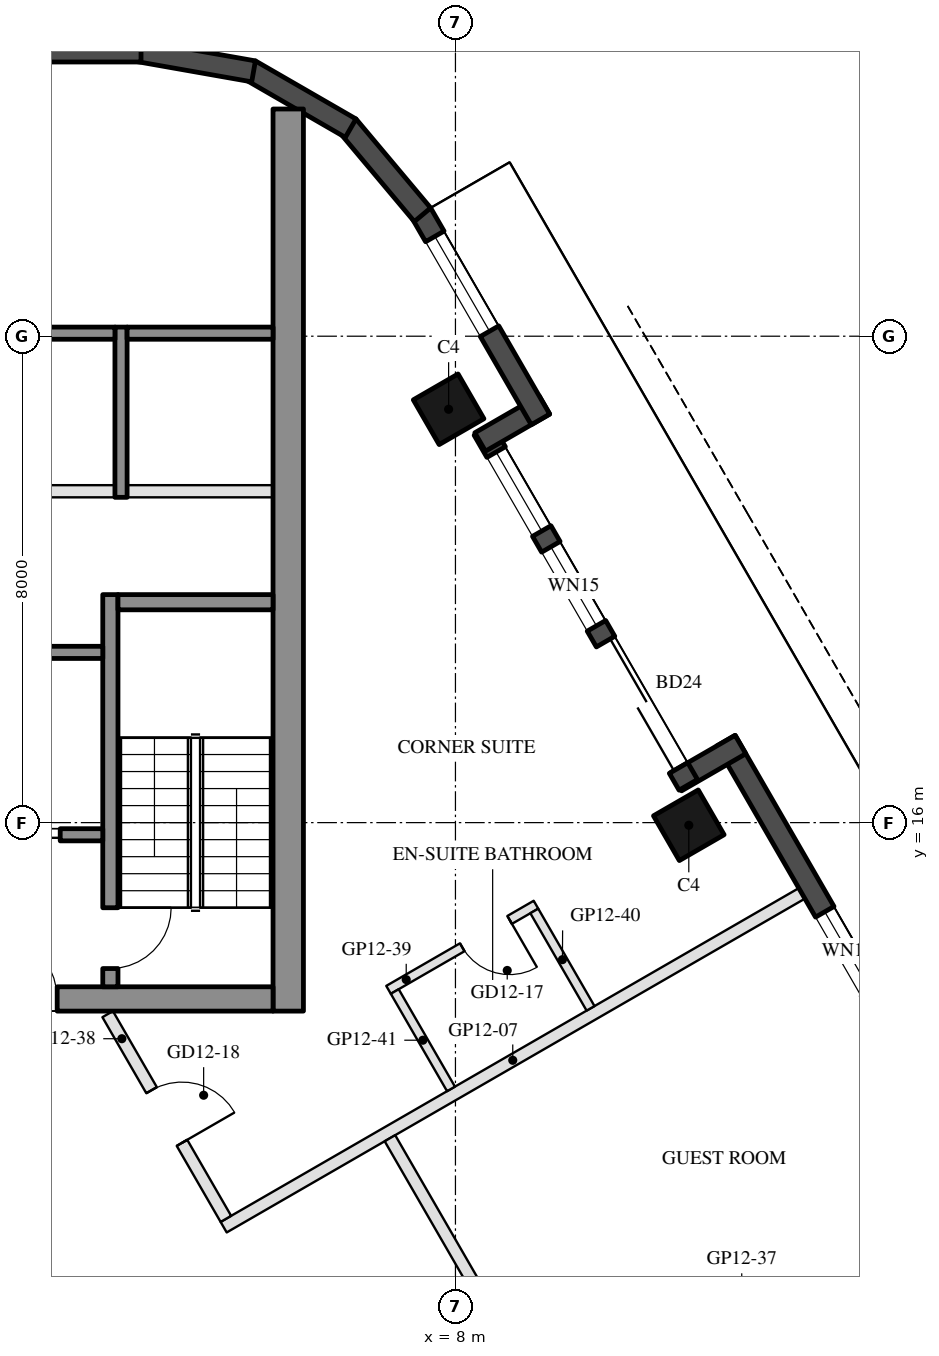
"""IFC4 building model, lengths in metres.
Left out: names, types, materials, properties, quantities, classifications, styles, units other than length and angle.
Written with IfcOpenShell. Run it as: python <this file> out.ifc"""

import sys

from ifc_helpers import new_model, si_unit, direction, frame, frame_2d, origin, origin_2d, place, context, subcontext, project, spatial, rectangle, hollow_rectangle, extrude, element, fill, save


model = new_model("IFC4")
c1 = context("Model", 3, precision=1e-05, world=origin(), true_north=direction((0.0, 1.0)))
c2 = subcontext(c1, "Body", "Model", "MODEL_VIEW")
j1 = project(units=[si_unit("LENGTHUNIT", "METRE"), si_unit("PLANEANGLEUNIT", "RADIAN")], contexts=[c1])
p1 = place(None, origin())
s1 = spatial("IfcSite", under=j1, at=p1, CompositionType="ELEMENT")
p2 = place(p1, origin())
s2 = spatial("IfcBuilding", under=s1, at=p2, CompositionType="ELEMENT")
p3 = place(p2, frame((0.0, 0.0, 150.3)))
s3 = spatial("IfcBuildingStorey", under=s2, at=p3, CompositionType="ELEMENT", Elevation=150.3)
for number, where, z_axis, x_axis in (
    (1, (11.838, 15.957, 0.0), (0.0, 0.0, 1.0), (-0.5, 0.866, 0.0)),
    (2, (7.888, 22.798, 0.0), (0.0, 0.0, 1.0), (-0.5, 0.866, 0.0)),
):
    element("IfcColumn", number, at=place(p3, frame(where, z_axis=z_axis, x_axis=x_axis)), inside=s3, PredefinedType="COLUMN", context=c2, shape_type="SweptSolid", body=[
        extrude(hollow_rectangle(XDim=0.85, YDim=0.85, WallThickness=0.04, at=origin_2d()), origin(), (0.0, 0.0, 1.0), 3.7),
    ])
p4 = place(p3, frame((17.299, 8.948, 0.0), z_axis=(0.0, 0.0, 1.0), x_axis=(-0.500010041276, 0.866019606374, 0.0)))
e3 = element("IfcWall", 3, at=p4, inside=s3, PredefinedType="SOLIDWALL", context=c2, shape_type="SweptSolid", body=[
    extrude(rectangle(XDim=9.7, YDim=0.35, at=frame_2d((4.85, 0.0))), origin(), (0.0, 0.0, 1.0), 3.55),
])
p5 = place(p4, frame((1.762, 0.0, 0.0)))
e4 = element("IfcOpeningElement", 4, at=p5, cuts=e3, PredefinedType="OPENING", context=c2, shape_type="SweptSolid", body=[
    extrude(rectangle(XDim=2.4, YDim=2.4, at=frame_2d((1.2, 1.2))), frame((0.0, 0.185, 0.0), z_axis=(0.0, -1.0, 0.0), x_axis=(1.0, 0.0, 0.0)), (0.0, 0.0, 1.0), 0.37),
])
p6 = place(p4, frame((4.949, 0.0, 0.3)))
e5 = element("IfcOpeningElement", 5, at=p6, cuts=e3, PredefinedType="OPENING", context=c2, shape_type="SweptSolid", body=[
    extrude(rectangle(XDim=1.5, YDim=2.65, at=frame_2d((0.75, 1.325))), frame((0.0, 0.185, 0.0), z_axis=(0.0, -1.0, 0.0), x_axis=(1.0, 0.0, 0.0)), (0.0, 0.0, 1.0), 0.37),
])
p7 = place(p3, frame((12.688, 17.284, 0.0), z_axis=(0.0, 0.0, 1.0), x_axis=(-0.865955602162, -0.500120880472, 0.0)))
e6 = element("IfcWall", 6, at=p7, inside=s3, PredefinedType="SOLIDWALL", context=c2, shape_type="SweptSolid", body=[
    extrude(rectangle(XDim=1.22, YDim=0.35, at=frame_2d((0.61, 0.0))), origin(), (0.0, 0.0, 1.0), 3.55),
])
p8 = place(p3, frame((11.829, 16.621, 0.0), z_axis=(0.0, 0.0, 1.0), x_axis=(-0.500003597184, 0.866023326939, 0.0)))
e7 = element("IfcWall", 7, at=p8, inside=s3, PredefinedType="SOLIDWALL", context=c2, shape_type="SweptSolid", body=[
    extrude(rectangle(XDim=6.74, YDim=0.35, at=frame_2d((3.37, 0.0))), origin(), (0.0, 0.0, 1.0), 3.55),
])
p9 = place(p8, frame((0.32, 0.0, 0.0)))
e8 = element("IfcOpeningElement", 8, at=p9, cuts=e7, PredefinedType="OPENING", context=c2, shape_type="SweptSolid", body=[
    extrude(rectangle(XDim=2.4, YDim=2.4, at=frame_2d((1.2, 1.2))), frame((0.0, 0.185, 0.0), z_axis=(0.0, -1.0, 0.0), x_axis=(1.0, 0.0, 0.0)), (0.0, 0.0, 1.0), 0.37),
])
p10 = place(p8, frame((3.02, 0.0, 0.3)))
e9 = element("IfcOpeningElement", 9, at=p10, cuts=e7, PredefinedType="OPENING", context=c2, shape_type="SweptSolid", body=[
    extrude(rectangle(XDim=1.5, YDim=2.65, at=frame_2d((0.75, 1.325))), frame((0.0, 0.185, 0.0), z_axis=(0.0, -1.0, 0.0), x_axis=(1.0, 0.0, 0.0)), (0.0, 0.0, 1.0), 0.37),
])
p11 = place(p8, frame((4.82, 0.0, 0.3)))
e10 = element("IfcOpeningElement", 10, at=p11, cuts=e7, PredefinedType="OPENING", context=c2, shape_type="SweptSolid", body=[
    extrude(rectangle(XDim=1.5, YDim=2.65, at=frame_2d((0.75, 1.325))), frame((0.0, 0.185, 0.0), z_axis=(0.0, -1.0, 0.0), x_axis=(1.0, 0.0, 0.0)), (0.0, 0.0, 1.0), 0.37),
])
p12 = place(p3, frame((8.406, 22.26, 0.0), z_axis=(0.0, 0.0, 1.0), x_axis=(0.865955602162, 0.500120880472, 0.0)))
e11 = element("IfcWall", 11, at=p12, inside=s3, PredefinedType="SOLIDWALL", context=c2, shape_type="SweptSolid", body=[
    extrude(rectangle(XDim=1.22, YDim=0.35, at=frame_2d((0.61, 0.0))), origin(), (0.0, 0.0, 1.0), 3.55),
])
p13 = place(p3, frame((9.398, 22.631, 0.0), z_axis=(0.0, 0.0, 1.0), x_axis=(-0.499954521343, 0.866051659307, 0.0)))
e12 = element("IfcWall", 12, at=p13, inside=s3, PredefinedType="SOLIDWALL", context=c2, shape_type="SweptSolid", body=[
    extrude(rectangle(XDim=3.916, YDim=0.35, at=frame_2d((1.958, 0.0))), origin(), (0.0, 0.0, 1.0), 3.55),
])
p14 = place(p13, frame((1.675, 0.0, 0.3)))
e13 = element("IfcOpeningElement", 13, at=p14, cuts=e12, PredefinedType="OPENING", context=c2, shape_type="SweptSolid", body=[
    extrude(rectangle(XDim=1.8, YDim=2.65, at=frame_2d((0.9, 1.325))), frame((0.0, 0.185, 0.0), z_axis=(0.0, -1.0, 0.0), x_axis=(1.0, 0.0, 0.0)), (0.0, 0.0, 1.0), 0.37),
])
p15 = place(p3, frame((7.458, 25.998, 0.0), z_axis=(0.0, 0.0, 1.0), x_axis=(-0.642808304945, 0.766027077259, 0.0)))
e14 = element("IfcWall", 14, at=p15, inside=s3, PredefinedType="SOLIDWALL", context=c2, shape_type="SweptSolid", body=[
    extrude(rectangle(XDim=1.91, YDim=0.35, at=frame_2d((0.955, 0.0))), origin(), (0.0, 0.0, 1.0), 3.55),
])
for number, where, z_axis, x_axis in (
    (15, (6.277, 27.422, 0.0), (0.0, 0.0, 1.0), (-0.866, 0.5, 0.0)),
    (16, (4.68, 28.356, 0.0), (0.0, 0.0, 1.0), (-0.985, 0.174, 0.0)),
):
    element("IfcWall", number, at=place(p3, frame(where, z_axis=z_axis, x_axis=x_axis)), inside=s3, PredefinedType="SOLIDWALL", context=c2, shape_type="SweptSolid", body=[
        extrude(rectangle(XDim=1.91, YDim=0.35, at=frame_2d((0.955, 0.0))), origin(), (0.0, 0.0, 1.0), 3.55),
    ])
p16 = place(p3, frame((2.829, 28.685, 0.0), z_axis=(0.0, 0.0, 1.0), x_axis=(-1.0, 0.0, 0.0)))
e17 = element("IfcWall", 17, at=p16, inside=s3, PredefinedType="SOLIDWALL", context=c2, shape_type="SweptSolid", body=[
    extrude(rectangle(XDim=5.658, YDim=0.35, at=frame_2d((2.829, 0.0))), origin(), (0.0, 0.0, 1.0), 3.55),
])
p17 = place(p3, frame((5.25, 12.9, 0.0), z_axis=(0.0, 0.0, 1.0), x_axis=(0.0, 1.0, 0.0)))
e18 = element("IfcWall", 18, at=p17, inside=s3, PredefinedType="SHEAR", context=c2, shape_type="SweptSolid", body=[
    extrude(rectangle(XDim=14.837, YDim=0.5, at=frame_2d((7.418, 0.0))), origin(), (0.0, 0.0, 1.0), 3.5),
])
p18 = place(p3, frame((5.0, 13.1, 0.0), z_axis=(0.0, 0.0, 1.0), x_axis=(-1.0, 0.0, 0.0)))
e19 = element("IfcWall", 19, at=p18, inside=s3, PredefinedType="SHEAR", context=c2, shape_type="SweptSolid", body=[
    extrude(rectangle(XDim=10.0, YDim=0.4, at=frame_2d((5.0, 0.0))), origin(), (0.0, 0.0, 1.0), 3.5),
])
p19 = place(p18, frame((3.55, 0.0, 0.0)))
e20 = element("IfcOpeningElement", 20, at=p19, cuts=e19, PredefinedType="OPENING", context=c2, shape_type="SweptSolid", body=[
    extrude(rectangle(XDim=1.1, YDim=2.1, at=frame_2d((0.55, 1.05))), frame((0.0, 0.21, 0.0), z_axis=(0.0, -1.0, 0.0), x_axis=(1.0, 0.0, 0.0)), (0.0, 0.0, 1.0), 0.42),
])
p20 = place(p18, frame((5.85, 0.0, 0.0)))
e21 = element("IfcOpeningElement", 21, at=p20, cuts=e19, PredefinedType="OPENING", context=c2, shape_type="SweptSolid", body=[
    extrude(rectangle(XDim=1.4, YDim=2.1, at=frame_2d((0.7, 1.05))), frame((0.0, 0.21, 0.0), z_axis=(0.0, -1.0, 0.0), x_axis=(1.0, 0.0, 0.0)), (0.0, 0.0, 1.0), 0.42),
])
p21 = place(p3, frame((2.325, 13.3, 0.0), z_axis=(0.0, 0.0, 1.0), x_axis=(0.0, 1.0, 0.0)))
e22 = element("IfcWall", 22, at=p21, inside=s3, PredefinedType="SHEAR", context=c2, shape_type="SweptSolid", body=[
    extrude(rectangle(XDim=6.45, YDim=0.25, at=frame_2d((3.225, 0.0))), origin(), (0.0, 0.0, 1.0), 3.5),
])
p22 = place(p21, frame((0.3, 0.0, 0.0)))
e23 = element("IfcOpeningElement", 23, at=p22, cuts=e22, PredefinedType="OPENING", context=c2, shape_type="SweptSolid", body=[
    extrude(rectangle(XDim=1.0, YDim=2.1, at=frame_2d((0.5, 1.05))), frame((0.0, 0.135, 0.0), z_axis=(0.0, -1.0, 0.0), x_axis=(1.0, 0.0, 0.0)), (0.0, 0.0, 1.0), 0.27),
])
p23 = place(p3, frame((5.0, 19.625, 0.0), z_axis=(0.0, 0.0, 1.0), x_axis=(-1.0, 0.0, 0.0)))
e24 = element("IfcWall", 24, at=p23, inside=s3, PredefinedType="SHEAR", context=c2, shape_type="SweptSolid", body=[
    extrude(rectangle(XDim=2.55, YDim=0.25, at=frame_2d((1.275, 0.0))), origin(), (0.0, 0.0, 1.0), 3.5),
])
p24 = place(p3, frame((2.2, 18.8, 0.0), z_axis=(0.0, 0.0, 1.0), x_axis=(-1.0, 0.0, 0.0)))
e25 = element("IfcWall", 25, at=p24, inside=s3, PredefinedType="SHEAR", context=c2, shape_type="SweptSolid", body=[
    extrude(rectangle(XDim=2.8, YDim=0.2, at=frame_2d((1.4, 0.0))), origin(), (0.0, 0.0, 1.0), 3.5),
])
p25 = place(p3, frame((2.2, 15.8, 0.0), z_axis=(0.0, 0.0, 1.0), x_axis=(-1.0, 0.0, 0.0)))
e26 = element("IfcWall", 26, at=p25, inside=s3, PredefinedType="SHEAR", context=c2, shape_type="SweptSolid", body=[
    extrude(rectangle(XDim=2.8, YDim=0.2, at=frame_2d((1.4, 0.0))), origin(), (0.0, 0.0, 1.0), 3.5),
])
p26 = place(p25, frame((0.7, 0.0, 0.0)))
e27 = element("IfcOpeningElement", 27, at=p26, cuts=e26, PredefinedType="OPENING", context=c2, shape_type="SweptSolid", body=[
    extrude(rectangle(XDim=1.2, YDim=2.1, at=frame_2d((0.6, 1.05))), frame((0.0, 0.11, 0.0), z_axis=(0.0, -1.0, 0.0), x_axis=(1.0, 0.0, 0.0)), (0.0, 0.0, 1.0), 0.22),
])
p27 = place(p3, frame((2.5, 21.35, 0.0), z_axis=(0.0, 0.0, 1.0), x_axis=(0.0, 1.0, 0.0)))
e28 = element("IfcWall", 28, at=p27, inside=s3, PredefinedType="SHEAR", context=c2, shape_type="SweptSolid", body=[
    extrude(rectangle(XDim=2.8, YDim=0.2, at=frame_2d((1.4, 0.0))), origin(), (0.0, 0.0, 1.0), 3.5),
])
p28 = place(p3, frame((5.0, 24.05, 0.0), z_axis=(0.0, 0.0, 1.0), x_axis=(-1.0, 0.0, 0.0)))
e29 = element("IfcWall", 29, at=p28, inside=s3, PredefinedType="SHEAR", context=c2, shape_type="SweptSolid", body=[
    extrude(rectangle(XDim=2.4, YDim=0.2, at=frame_2d((1.2, 0.0))), origin(), (0.0, 0.0, 1.0), 3.5),
])
p29 = place(p3, frame((2.4, 24.05, 0.0), z_axis=(0.0, 0.0, 1.0), x_axis=(-1.0, 0.0, 0.0)))
e30 = element("IfcWall", 30, at=p29, inside=s3, PredefinedType="SHEAR", context=c2, shape_type="SweptSolid", body=[
    extrude(rectangle(XDim=2.8, YDim=0.2, at=frame_2d((1.4, 0.0))), origin(), (0.0, 0.0, 1.0), 3.5),
])
p30 = place(p3, frame((5.0, 21.45, 0.0), z_axis=(0.0, 0.0, 1.0), x_axis=(-1.0, 0.0, 0.0)))
e31 = element("IfcWall", 31, at=p30, inside=s3, PredefinedType="PARTITIONING", context=c2, shape_type="SweptSolid", body=[
    extrude(rectangle(XDim=2.4, YDim=0.2, at=frame_2d((1.2, 0.0))), origin(), (0.0, 0.0, 1.0), 3.5),
])
p31 = place(p3, frame((2.4, 21.45, 0.0), z_axis=(0.0, 0.0, 1.0), x_axis=(-1.0, 0.0, 0.0)))
e32 = element("IfcWall", 32, at=p31, inside=s3, PredefinedType="PARTITIONING", context=c2, shape_type="SweptSolid", body=[
    extrude(rectangle(XDim=2.8, YDim=0.2, at=frame_2d((1.4, 0.0))), origin(), (0.0, 0.0, 1.0), 3.5),
])
p32 = place(p3, frame((13.697, 14.836, 0.0), z_axis=(0.0, 0.0, 1.0), x_axis=(-0.866027479907, -0.499996404033, 0.0)))
e33 = element("IfcWall", 33, at=p32, inside=s3, PredefinedType="PARTITIONING", context=c2, shape_type="SweptSolid", body=[
    extrude(rectangle(XDim=10.98, YDim=0.2, at=frame_2d((5.49, 0.0))), origin(), (0.0, 0.0, 1.0), 3.06),
])
p33 = place(p3, frame((6.923, 10.81, 0.0), z_axis=(0.0, 0.0, 1.0), x_axis=(0.500007257026, -0.866021213898, 0.0)))
e34 = element("IfcWall", 34, at=p33, inside=s3, PredefinedType="PARTITIONING", context=c2, shape_type="SweptSolid", body=[
    extrude(rectangle(XDim=7.569, YDim=0.2, at=frame_2d((3.784, 0.0))), origin(), (0.0, 0.0, 1.0), 2.95),
])
p34 = place(p33, frame((4.121, 0.0, 0.0)))
e35 = element("IfcOpeningElement", 35, at=p34, cuts=e34, PredefinedType="OPENING", context=c2, shape_type="SweptSolid", body=[
    extrude(rectangle(XDim=1.0, YDim=2.1, at=frame_2d((0.5, 1.05))), frame((0.0, 0.11, 0.0), z_axis=(0.0, -1.0, 0.0), x_axis=(1.0, 0.0, 0.0)), (0.0, 0.0, 1.0), 0.22),
])
p35 = place(p3, frame((2.281, 12.85, 0.0), z_axis=(0.0, 0.0, 1.0), x_axis=(0.500008716408, -0.866020371305, 0.0)))
e36 = element("IfcWall", 36, at=p35, inside=s3, PredefinedType="PARTITIONING", context=c2, shape_type="SweptSolid", body=[
    extrude(rectangle(XDim=3.888, YDim=0.2, at=frame_2d((1.944, 0.0))), origin(), (0.0, 0.0, 1.0), 2.95),
])
p36 = place(p35, frame((1.444, 0.0, 0.0)))
e37 = element("IfcOpeningElement", 37, at=p36, cuts=e36, PredefinedType="OPENING", context=c2, shape_type="SweptSolid", body=[
    extrude(rectangle(XDim=1.0, YDim=2.1, at=frame_2d((0.5, 1.05))), frame((0.0, 0.11, 0.0), z_axis=(0.0, -1.0, 0.0), x_axis=(1.0, 0.0, 0.0)), (0.0, 0.0, 1.0), 0.22),
])
p37 = place(p3, frame((9.324, 14.65, 0.0), z_axis=(0.0, 0.0, 1.0), x_axis=(-0.866034573852, -0.49998411664, 0.0)))
e38 = element("IfcWall", 38, at=p37, inside=s3, PredefinedType="PARTITIONING", context=c2, shape_type="SweptSolid", body=[
    extrude(rectangle(XDim=2.8, YDim=0.15, at=frame_2d((1.4, 0.0))), origin(), (0.0, 0.0, 1.0), 2.95),
])
p38 = place(p37, frame((0.5, 0.0, 0.0)))
e39 = element("IfcOpeningElement", 39, at=p38, cuts=e38, PredefinedType="OPENING", context=c2, shape_type="SweptSolid", body=[
    extrude(rectangle(XDim=0.9, YDim=2.1, at=frame_2d((0.45, 1.05))), frame((0.0, 0.085, 0.0), z_axis=(0.0, -1.0, 0.0), x_axis=(1.0, 0.0, 0.0)), (0.0, 0.0, 1.0), 0.17),
])
for number, where, z_axis, x_axis in (
    (40, (10.222, 12.945, 0.0), (0.0, 0.0, 1.0), (-0.5, 0.866, 0.0)),
    (41, (7.927, 11.62, 0.0), (0.0, 0.0, 1.0), (-0.5, 0.866, 0.0)),
):
    element("IfcWall", number, at=place(p3, frame(where, z_axis=z_axis, x_axis=x_axis)), inside=s3, PredefinedType="PARTITIONING", context=c2, shape_type="SweptSolid", body=[
        extrude(rectangle(XDim=1.85, YDim=0.15, at=frame_2d((0.925, 0.0))), origin(), (0.0, 0.0, 1.0), 2.95),
    ])
p39 = place(p6, origin())
e42 = element("IfcWindow", 42, at=p39, inside=s3, PartitioningType="SINGLE_PANEL", PredefinedType="WINDOW", context=c2, shape_type="SweptSolid", body=[
    extrude(rectangle(XDim=1.5, YDim=2.65, at=frame_2d((0.75, 1.325))), frame((0.0, 0.03, 0.0), z_axis=(0.0, -1.0, 0.0), x_axis=(1.0, 0.0, 0.0)), (0.0, 0.0, 1.0), 0.06),
])
fill(e5, e42)
p40 = place(p9, frame((2.4, 0.0, 0.0), z_axis=(0.0, 0.0, 1.0), x_axis=(-1.0, 0.0, 0.0)))
e43 = element("IfcDoor", 43, at=p40, inside=s3, OperationType="SLIDING_TO_LEFT", PredefinedType="DOOR", context=c2, shape_type="SweptSolid", body=[
    extrude(rectangle(XDim=2.4, YDim=2.4, at=frame_2d((1.2, 1.2))), frame((0.0, 0.025, 0.0), z_axis=(0.0, -1.0, 0.0), x_axis=(1.0, 0.0, 0.0)), (0.0, 0.0, 1.0), 0.05),
])
fill(e8, e43)
p41 = place(p10, origin())
e44 = element("IfcWindow", 44, at=p41, inside=s3, PartitioningType="SINGLE_PANEL", PredefinedType="WINDOW", context=c2, shape_type="SweptSolid", body=[
    extrude(rectangle(XDim=1.5, YDim=2.65, at=frame_2d((0.75, 1.325))), frame((0.0, 0.03, 0.0), z_axis=(0.0, -1.0, 0.0), x_axis=(1.0, 0.0, 0.0)), (0.0, 0.0, 1.0), 0.06),
])
fill(e9, e44)
p42 = place(p11, origin())
e45 = element("IfcWindow", 45, at=p42, inside=s3, PartitioningType="SINGLE_PANEL", PredefinedType="WINDOW", context=c2, shape_type="SweptSolid", body=[
    extrude(rectangle(XDim=1.5, YDim=2.65, at=frame_2d((0.75, 1.325))), frame((0.0, 0.03, 0.0), z_axis=(0.0, -1.0, 0.0), x_axis=(1.0, 0.0, 0.0)), (0.0, 0.0, 1.0), 0.06),
])
fill(e10, e45)
p43 = place(p14, origin())
e46 = element("IfcWindow", 46, at=p43, inside=s3, PartitioningType="SINGLE_PANEL", PredefinedType="WINDOW", context=c2, shape_type="SweptSolid", body=[
    extrude(rectangle(XDim=1.8, YDim=2.65, at=frame_2d((0.9, 1.325))), frame((0.0, 0.03, 0.0), z_axis=(0.0, -1.0, 0.0), x_axis=(1.0, 0.0, 0.0)), (0.0, 0.0, 1.0), 0.06),
])
fill(e13, e46)
p44 = place(p26, origin())
e47 = element("IfcDoor", 47, at=p44, inside=s3, OperationType="DOUBLE_DOOR_SLIDING", PredefinedType="DOOR", context=c2, shape_type="SweptSolid", body=[
    extrude(rectangle(XDim=1.2, YDim=2.1, at=frame_2d((0.6, 1.05))), frame((0.0, 0.025, 0.0), z_axis=(0.0, -1.0, 0.0), x_axis=(1.0, 0.0, 0.0)), (0.0, 0.0, 1.0), 0.05),
])
fill(e27, e47)
p45 = place(p19, frame((1.1, 0.0, 0.0), z_axis=(0.0, 0.0, 1.0), x_axis=(-1.0, 0.0, 0.0)))
e48 = element("IfcDoor", 48, at=p45, inside=s3, OperationType="SINGLE_SWING_LEFT", PredefinedType="DOOR", context=c2, shape_type="SweptSolid", body=[
    extrude(rectangle(XDim=1.1, YDim=2.1, at=frame_2d((0.55, 1.05))), frame((0.0, 0.025, 0.0), z_axis=(0.0, -1.0, 0.0), x_axis=(1.0, 0.0, 0.0)), (0.0, 0.0, 1.0), 0.05),
])
fill(e20, e48)
p46 = place(p22, frame((1.0, 0.0, 0.0), z_axis=(0.0, 0.0, 1.0), x_axis=(-1.0, 0.0, 0.0)))
e49 = element("IfcDoor", 49, at=p46, inside=s3, OperationType="SINGLE_SWING_LEFT", PredefinedType="DOOR", context=c2, shape_type="SweptSolid", body=[
    extrude(rectangle(XDim=1.0, YDim=2.1, at=frame_2d((0.5, 1.05))), frame((0.0, 0.025, 0.0), z_axis=(0.0, -1.0, 0.0), x_axis=(1.0, 0.0, 0.0)), (0.0, 0.0, 1.0), 0.05),
])
fill(e23, e49)
p47 = place(p38, origin())
e50 = element("IfcDoor", 50, at=p47, inside=s3, OperationType="SINGLE_SWING_LEFT", PredefinedType="DOOR", context=c2, shape_type="SweptSolid", body=[
    extrude(rectangle(XDim=0.9, YDim=2.1, at=frame_2d((0.45, 1.05))), frame((0.0, 0.025, 0.0), z_axis=(0.0, -1.0, 0.0), x_axis=(1.0, 0.0, 0.0)), (0.0, 0.0, 1.0), 0.05),
])
fill(e39, e50)
p48 = place(p36, origin())
e51 = element("IfcDoor", 51, at=p48, inside=s3, OperationType="SINGLE_SWING_RIGHT", PredefinedType="DOOR", context=c2, shape_type="SweptSolid", body=[
    extrude(rectangle(XDim=1.0, YDim=2.1, at=frame_2d((0.5, 1.05))), frame((0.0, 0.025, 0.0), z_axis=(0.0, -1.0, 0.0), x_axis=(1.0, 0.0, 0.0)), (0.0, 0.0, 1.0), 0.05),
])
fill(e37, e51)
save(model, sys.argv[1])
